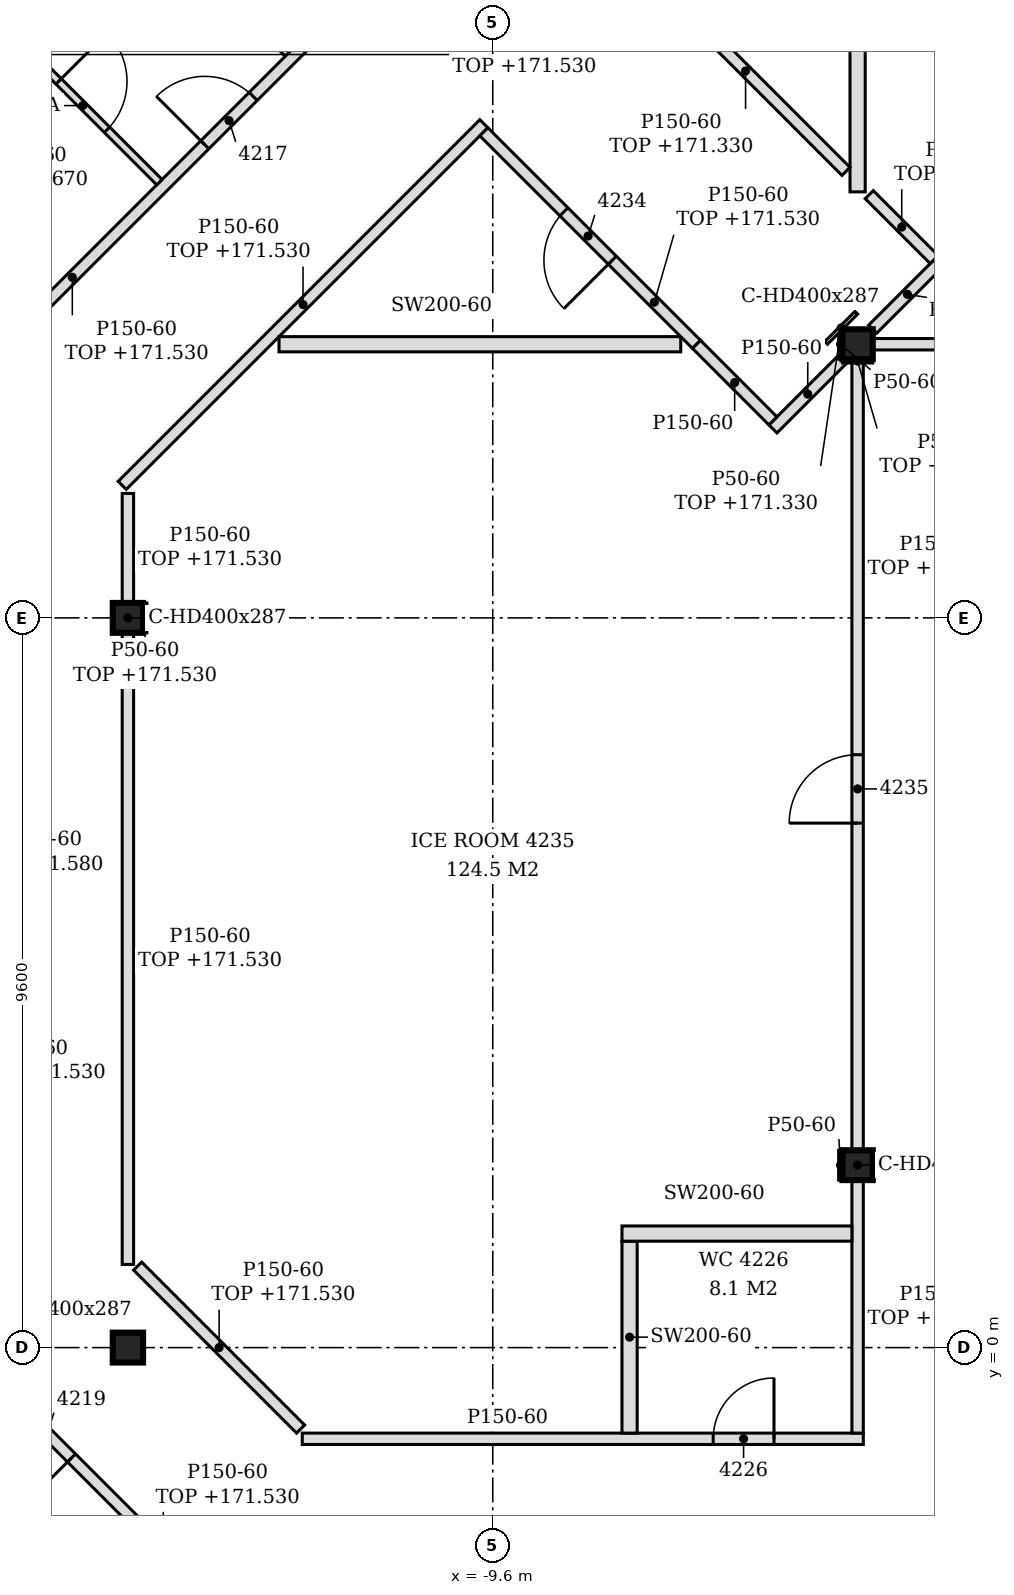
"""IFC4 building model, lengths in metres.
Left out: names, types, materials, properties, quantities, classifications, styles, units other than length and angle.
Written with IfcOpenShell. Run it as: python <this file> out.ifc"""

import sys

from ifc_helpers import new_model, si_unit, direction, frame, frame_2d, origin, origin_2d, place, context, subcontext, project, spatial, polyline, rectangle, i_section, outline, extrude, element, fill, save


model = new_model("IFC4")
c1 = context("Model", 3, precision=1e-05, world=origin(), true_north=direction((0.0, 1.0)))
c2 = subcontext(c1, "Body", "Model", "MODEL_VIEW")
j1 = project(units=[si_unit("LENGTHUNIT", "METRE"), si_unit("PLANEANGLEUNIT", "RADIAN")], contexts=[c1])
p1 = place(None, origin())
s1 = spatial("IfcSite", under=j1, at=p1, CompositionType="ELEMENT")
p2 = place(p1, origin())
s2 = spatial("IfcBuilding", under=s1, at=p2, CompositionType="ELEMENT")
p3 = place(p2, frame((0.0, 0.0, 168.6)))
s3 = spatial("IfcBuildingStorey", under=s2, at=p3, CompositionType="ELEMENT", Elevation=168.6)
for number, where, z_axis, x_axis in (
    (1, (-4.8, 2.4, -0.15), (0.0, 0.0, 1.0), (1.0, 0.0, 0.0)),
    (2, (-4.8, 13.2, -0.15), (0.0, 0.0, 1.0), (1.0, 0.0, 0.0)),
    (3, (-14.4, 0.0, -0.15), (0.0, 0.0, 1.0), (1.0, 0.0, 0.0)),
    (4, (-14.4, 9.6, -0.15), (0.0, 0.0, 1.0), (1.0, 0.0, 0.0)),
):
    element("IfcColumn", number, at=place(p3, frame(where, z_axis=z_axis, x_axis=x_axis)), inside=s3, PredefinedType="COLUMN", context=c2, shape_type="SweptSolid", body=[
        extrude(i_section(OverallWidth=0.399, OverallDepth=0.393, WebThickness=0.023, FlangeThickness=0.037, FilletRadius=0.015, at=origin_2d()), origin(), (0.0, 0.0, 1.0), 3.6),
    ])
p4 = place(p3, frame((-8.322, -8.272, 0.0), z_axis=(0.0, 0.0, 1.0), x_axis=(-0.707117118476, 0.707096443746, 0.0)))
e5 = element("IfcWall", 5, at=p4, inside=s3, PredefinedType="PARTITIONING", context=c2, shape_type="SweptSolid", body=[
    extrude(rectangle(XDim=11.809, YDim=0.15, at=frame_2d((5.904, 0.0))), origin(), (0.0, 0.0, 1.0), 2.93),
])
p5 = place(p4, frame((9.645, 0.0, 0.0)))
e6 = element("IfcOpeningElement", 6, at=p5, cuts=e5, PredefinedType="OPENING", context=c2, shape_type="SweptSolid", body=[
    extrude(rectangle(XDim=0.9, YDim=2.1, at=frame_2d((0.45, 1.05))), frame((0.0, 0.085, 0.0), z_axis=(0.0, -1.0, 0.0), x_axis=(1.0, 0.0, 0.0)), (0.0, 0.0, 1.0), 0.17),
])
p6 = place(p4, frame((5.33, 0.0, 0.0)))
e7 = element("IfcOpeningElement", 7, at=p6, cuts=e5, PredefinedType="OPENING", context=c2, shape_type="SweptSolid", body=[
    extrude(rectangle(XDim=0.9, YDim=2.1, at=frame_2d((0.45, 1.05))), frame((0.0, 0.085, 0.0), z_axis=(0.0, -1.0, 0.0), x_axis=(1.0, 0.0, 0.0)), (0.0, 0.0, 1.0), 0.17),
])
p7 = place(p4, frame((1.139, 0.0, 0.0)))
e8 = element("IfcOpeningElement", 8, at=p7, cuts=e5, PredefinedType="OPENING", context=c2, shape_type="SweptSolid", body=[
    extrude(rectangle(XDim=0.9, YDim=2.1, at=frame_2d((0.45, 1.05))), frame((0.0, 0.085, 0.0), z_axis=(0.0, -1.0, 0.0), x_axis=(1.0, 0.0, 0.0)), (0.0, 0.0, 1.0), 0.17),
])
p8 = place(p3, frame((-12.106, -1.2, 0.0), z_axis=(0.0, 0.0, 1.0), x_axis=(1.0, 0.0, 0.0)))
e9 = element("IfcWall", 9, at=p8, inside=s3, PredefinedType="PARTITIONING", context=c2, shape_type="SweptSolid", body=[
    extrude(outline(polyline([(0.0, 0.0), (7.381, 0.0), (7.381, 2.83), (7.156, 2.83), (7.154, 3.45), (0.0, 3.45), (0.0, 0.0)])), frame((0.0, 0.075, 0.0), z_axis=(0.0, -1.0, 0.0), x_axis=(1.0, 0.0, 0.0)), (0.0, 0.0, 1.0), 0.15),
])
p9 = place(p8, frame((5.406, 0.0, 0.0)))
e10 = element("IfcOpeningElement", 10, at=p9, cuts=e9, PredefinedType="OPENING", context=c2, shape_type="SweptSolid", body=[
    extrude(rectangle(XDim=0.8, YDim=2.1, at=frame_2d((0.4, 1.05))), frame((0.0, 0.085, 0.0), z_axis=(0.0, -1.0, 0.0), x_axis=(1.0, 0.0, 0.0)), (0.0, 0.0, 1.0), 0.17),
])
p10 = place(p3, frame((-12.128, -1.072, 0.0), z_axis=(0.0, 0.0, 1.0), x_axis=(-0.707106781187, 0.707106781187, 0.0)))
e11 = element("IfcWall", 11, at=p10, inside=s3, PredefinedType="PARTITIONING", context=c2, shape_type="SweptSolid", body=[
    extrude(rectangle(XDim=3.032, YDim=0.15, at=frame_2d((1.516, 0.0))), origin(), (0.0, 0.0, 1.0), 2.93),
])
p11 = place(p3, frame((-7.8, -1.125, 0.0), z_axis=(0.0, 0.0, 1.0), x_axis=(0.0, 1.0, 0.0)))
e12 = element("IfcWall", 12, at=p11, inside=s3, PredefinedType="PARTITIONING", context=c2, shape_type="SweptSolid", body=[
    extrude(outline(polyline([(0.0, 0.0), (2.525, 0.0), (2.525, 3.45), (1.225, 3.45), (1.223, 2.93), (1.025, 2.93), (1.023, 3.45), (0.0, 3.45), (0.0, 0.0)])), frame((0.0, 0.1, 0.0), z_axis=(0.0, -1.0, 0.0), x_axis=(1.0, 0.0, 0.0)), (0.0, 0.0, 1.0), 0.2),
])
p12 = place(p3, frame((-4.8, -1.125, 0.0), z_axis=(0.0, 0.0, 1.0), x_axis=(0.0, 1.0, 0.0)))
e13 = element("IfcWall", 13, at=p12, inside=s3, PredefinedType="PARTITIONING", context=c2, shape_type="SweptSolid", body=[
    extrude(rectangle(XDim=3.329, YDim=0.15, at=frame_2d((1.664, 0.0))), origin(), (0.0, 0.0, 1.0), 2.83),
])
p13 = place(p3, frame((-14.4, 1.094, 0.0), z_axis=(0.0, 0.0, 1.0), x_axis=(0.0, 1.0, 0.0)))
e14 = element("IfcWall", 14, at=p13, inside=s3, PredefinedType="PARTITIONING", context=c2, shape_type="SweptSolid", body=[
    extrude(rectangle(XDim=8.31, YDim=0.15, at=frame_2d((4.155, 0.0))), origin(), (0.0, 0.0, 1.0), 2.93),
])
p14 = place(p3, frame((-7.9, 1.5, 0.0), z_axis=(0.0, 0.0, 1.0), x_axis=(1.0, 0.0, 0.0)))
e15 = element("IfcWall", 15, at=p14, inside=s3, PredefinedType="PARTITIONING", context=c2, shape_type="SweptSolid", body=[
    extrude(outline(polyline([(0.0, 0.0), (3.025, 0.0), (3.025, 2.83), (2.95, 2.83), (2.948, 3.45), (0.0, 3.45), (0.0, 0.0)])), frame((0.0, 0.1, 0.0), z_axis=(0.0, -1.0, 0.0), x_axis=(1.0, 0.0, 0.0)), (0.0, 0.0, 1.0), 0.2),
])
p15 = place(p3, frame((-4.8, 2.596, 0.0), z_axis=(0.0, 0.0, 1.0), x_axis=(0.0, 1.0, 0.0)))
e16 = element("IfcWall", 16, at=p15, inside=s3, PredefinedType="PARTITIONING", context=c2, shape_type="SweptSolid", body=[
    extrude(rectangle(XDim=10.407, YDim=0.15, at=frame_2d((5.204, 0.0))), origin(), (0.0, 0.0, 1.0), 2.83),
])
p16 = place(p15, frame((4.303, 0.0, 0.0)))
e17 = element("IfcOpeningElement", 17, at=p16, cuts=e16, PredefinedType="OPENING", context=c2, shape_type="SweptSolid", body=[
    extrude(rectangle(XDim=0.9, YDim=2.1, at=frame_2d((0.45, 1.05))), frame((0.0, 0.085, 0.0), z_axis=(0.0, -1.0, 0.0), x_axis=(1.0, 0.0, 0.0)), (0.0, 0.0, 1.0), 0.17),
])
p17 = place(p3, frame((-14.4, 9.796, 0.0), z_axis=(0.0, 0.0, 1.0), x_axis=(0.0, 1.0, 0.0)))
e18 = element("IfcWall", 18, at=p17, inside=s3, PredefinedType="PARTITIONING", context=c2, shape_type="SweptSolid", body=[
    extrude(rectangle(XDim=1.44, YDim=0.15, at=frame_2d((0.72, 0.0))), origin(), (0.0, 0.0, 1.0), 2.93),
])
p18 = place(p3, frame((-14.475, 11.343, 0.0), z_axis=(0.0, 0.0, 1.0), x_axis=(0.707124921665, 0.707088640243, 0.0)))
e19 = element("IfcWall", 19, at=p18, inside=s3, PredefinedType="PARTITIONING", context=c2, shape_type="SweptSolid", body=[
    extrude(rectangle(XDim=6.729, YDim=0.15, at=frame_2d((3.365, 0.0))), origin(), (0.0, 0.0, 1.0), 2.93),
])
p19 = place(p3, frame((-5.914, 12.086, 0.0), z_axis=(0.0, 0.0, 1.0), x_axis=(0.707106781187, 0.707106781187, 0.0)))
e20 = element("IfcWall", 20, at=p19, inside=s3, PredefinedType="PARTITIONING", context=c2, shape_type="SweptSolid", body=[
    extrude(rectangle(XDim=1.295, YDim=0.15, at=frame_2d((0.648, 0.0))), origin(), (0.0, 0.0, 1.0), 3.45),
])
p20 = place(p3, frame((-5.914, 12.192, 0.0), z_axis=(0.0, 0.0, 1.0), x_axis=(-0.706763941595, 0.707449454633, 0.0)))
e21 = element("IfcWall", 21, at=p20, inside=s3, PredefinedType="PARTITIONING", context=c2, shape_type="SweptSolid", body=[
    extrude(rectangle(XDim=1.425, YDim=0.15, at=frame_2d((0.712, 0.0))), origin(), (0.0, 0.0, 1.0), 3.45),
])
p21 = place(p3, frame((-16.875, 12.337, 0.0), z_axis=(0.0, 0.0, 1.0), x_axis=(0.707106781187, 0.707106781187, 0.0)))
e22 = element("IfcWall", 22, at=p21, inside=s3, PredefinedType="PARTITIONING", context=c2, shape_type="SweptSolid", body=[
    extrude(rectangle(XDim=9.148, YDim=0.15, at=frame_2d((4.574, 0.0))), origin(), (0.0, 0.0, 1.0), 2.93),
])
p22 = place(p21, frame((7.426, 0.0, 0.0)))
e23 = element("IfcOpeningElement", 23, at=p22, cuts=e22, PredefinedType="OPENING", context=c2, shape_type="SweptSolid", body=[
    extrude(rectangle(XDim=0.9, YDim=2.1, at=frame_2d((0.45, 1.05))), frame((0.0, 0.085, 0.0), z_axis=(0.0, -1.0, 0.0), x_axis=(1.0, 0.0, 0.0)), (0.0, 0.0, 1.0), 0.17),
])
p23 = place(p21, frame((4.932, 0.0, 0.0)))
e24 = element("IfcOpeningElement", 24, at=p23, cuts=e22, PredefinedType="OPENING", context=c2, shape_type="SweptSolid", body=[
    extrude(rectangle(XDim=0.9, YDim=2.1, at=frame_2d((0.45, 1.05))), frame((0.0, 0.085, 0.0), z_axis=(0.0, -1.0, 0.0), x_axis=(1.0, 0.0, 0.0)), (0.0, 0.0, 1.0), 0.17),
])
p24 = place(p3, frame((-12.412, 13.2, 0.0), z_axis=(0.0, 0.0, 1.0), x_axis=(1.0, 0.0, 0.0)))
e25 = element("IfcWall", 25, at=p24, inside=s3, PredefinedType="PARTITIONING", context=c2, shape_type="SweptSolid", body=[
    extrude(rectangle(XDim=5.285, YDim=0.2, at=frame_2d((2.643, 0.0))), origin(), (0.0, 0.0, 1.0), 3.45),
])
p25 = place(p3, frame((-6.921, 13.2, 0.0), z_axis=(0.0, 0.0, 1.0), x_axis=(-0.707230271715, 0.706983269088, 0.0)))
e26 = element("IfcWall", 26, at=p25, inside=s3, PredefinedType="PARTITIONING", context=c2, shape_type="SweptSolid", body=[
    extrude(rectangle(XDim=3.954, YDim=0.15, at=frame_2d((1.977, 0.0))), origin(), (0.0, 0.0, 1.0), 2.93),
])
p26 = place(p25, frame((1.564, 0.0, 0.0)))
e27 = element("IfcOpeningElement", 27, at=p26, cuts=e26, PredefinedType="OPENING", context=c2, shape_type="SweptSolid", body=[
    extrude(rectangle(XDim=0.9, YDim=2.1, at=frame_2d((0.45, 1.05))), frame((0.0, 0.085, 0.0), z_axis=(0.0, -1.0, 0.0), x_axis=(1.0, 0.0, 0.0)), (0.0, 0.0, 1.0), 0.17),
])
p27 = place(p3, frame((-4.601, 13.2, 0.0), z_axis=(0.0, 0.0, 1.0), x_axis=(1.0, 0.0, 0.0)))
e28 = element("IfcWall", 28, at=p27, inside=s3, PredefinedType="PARTITIONING", context=c2, shape_type="SweptSolid", body=[
    extrude(rectangle(XDim=9.476, YDim=0.15, at=frame_2d((4.738, 0.0))), origin(), (0.0, 0.0, 1.0), 2.83),
])
p28 = place(p27, frame((4.151, 0.0, 0.0)))
e29 = element("IfcOpeningElement", 29, at=p28, cuts=e28, PredefinedType="OPENING", context=c2, shape_type="SweptSolid", body=[
    extrude(rectangle(XDim=0.9, YDim=2.1, at=frame_2d((0.45, 1.05))), frame((0.0, 0.085, 0.0), z_axis=(0.0, -1.0, 0.0), x_axis=(1.0, 0.0, 0.0)), (0.0, 0.0, 1.0), 0.17),
])
p29 = place(p3, frame((-4.602, 13.398, 0.0), z_axis=(0.0, 0.0, 1.0), x_axis=(0.707106781187, 0.707106781187, 0.0)))
e30 = element("IfcWall", 30, at=p29, inside=s3, PredefinedType="PARTITIONING", context=c2, shape_type="SweptSolid", body=[
    extrude(rectangle(XDim=1.296, YDim=0.15, at=frame_2d((0.648, 0.0))), origin(), (0.0, 0.0, 1.0), 3.45),
])
p30 = place(p3, frame((-3.792, 14.314, 0.0), z_axis=(0.0, 0.0, 1.0), x_axis=(-0.707409718716, 0.706803713817, 0.0)))
e31 = element("IfcWall", 31, at=p30, inside=s3, PredefinedType="PARTITIONING", context=c2, shape_type="SweptSolid", body=[
    extrude(rectangle(XDim=1.208, YDim=0.15, at=frame_2d((0.604, 0.0))), origin(), (0.0, 0.0, 1.0), 2.73),
])
p31 = place(p3, frame((-4.8, 15.205, 0.0), z_axis=(0.0, 0.0, 1.0), x_axis=(0.0, 1.0, 0.0)))
e32 = element("IfcWall", 32, at=p31, inside=s3, PredefinedType="PARTITIONING", context=c2, shape_type="SweptSolid", body=[
    extrude(rectangle(XDim=5.607, YDim=0.2, at=frame_2d((2.804, 0.0))), origin(), (0.0, 0.0, 1.0), 2.73),
])
p32 = place(p3, frame((-13.986, 15.332, 0.0), z_axis=(0.0, 0.0, 1.0), x_axis=(-0.707106781187, 0.707106781187, 0.0)))
e33 = element("IfcWall", 33, at=p32, inside=s3, PredefinedType="PARTITIONING", context=c2, shape_type="SweptSolid", body=[
    extrude(rectangle(XDim=2.874, YDim=0.1, at=frame_2d((1.437, 0.0))), origin(), (0.0, 0.0, 1.0), 2.93),
])
p33 = place(p32, frame((0.975, 0.0, 0.0)))
e34 = element("IfcOpeningElement", 34, at=p33, cuts=e33, PredefinedType="OPENING", context=c2, shape_type="SweptSolid", body=[
    extrude(rectangle(XDim=0.9, YDim=2.1, at=frame_2d((0.45, 1.05))), frame((0.0, 0.06, 0.0), z_axis=(0.0, -1.0, 0.0), x_axis=(1.0, 0.0, 0.0)), (0.0, 0.0, 1.0), 0.12),
])
p34 = place(p3, frame((-4.953, 15.474, 0.0), z_axis=(0.0, 0.0, 1.0), x_axis=(-0.707008778354, 0.707204770438, 0.0)))
e35 = element("IfcWall", 35, at=p34, inside=s3, PredefinedType="PARTITIONING", context=c2, shape_type="SweptSolid", body=[
    extrude(rectangle(XDim=3.737, YDim=0.15, at=frame_2d((1.869, 0.0))), origin(), (0.0, 0.0, 1.0), 2.73),
])
p35 = place(p3, frame((-12.259, 17.059, 0.0), z_axis=(0.0, 0.0, 1.0), x_axis=(-0.707106781187, 0.707106781187, 0.0)))
e36 = element("IfcWall", 36, at=p35, inside=s3, PredefinedType="PARTITIONING", context=c2, shape_type="SweptSolid", body=[
    extrude(rectangle(XDim=2.748, YDim=0.2, at=frame_2d((1.374, 0.0))), origin(), (0.0, 0.0, 1.0), 2.93),
])
p36 = place(p3, frame((-5.024, 2.204, 0.0), z_axis=(0.0, 0.0, 1.0), x_axis=(0.0, 1.0, 0.0)))
e37 = element("IfcWall", 37, at=p36, inside=s3, PredefinedType="PARTITIONING", context=c2, shape_type="SweptSolid", body=[
    extrude(rectangle(XDim=0.393, YDim=0.05, at=frame_2d((0.196, 0.0))), origin(), (0.0, 0.0, 1.0), 3.45),
])
p37 = place(p3, frame((-5.024, 13.003, 0.0), z_axis=(0.0, 0.0, 1.0), x_axis=(0.0, 1.0, 0.0)))
e38 = element("IfcWall", 38, at=p37, inside=s3, PredefinedType="PARTITIONING", context=c2, shape_type="SweptSolid", body=[
    extrude(rectangle(XDim=0.393, YDim=0.05, at=frame_2d((0.197, 0.0))), origin(), (0.0, 0.0, 1.0), 3.45),
])
p38 = place(p3, frame((-14.176, 9.404, 0.0), z_axis=(0.0, 0.0, 1.0), x_axis=(0.0, 1.0, 0.0)))
e39 = element("IfcWall", 39, at=p38, inside=s3, PredefinedType="PARTITIONING", context=c2, shape_type="SweptSolid", body=[
    extrude(rectangle(XDim=0.393, YDim=0.05, at=frame_2d((0.196, 0.0))), origin(), (0.0, 0.0, 1.0), 2.93),
])
p39 = place(p3, frame((-5.214, 13.218, 0.0), z_axis=(0.0, 0.0, 1.0), x_axis=(0.707106781187, 0.707106781187, 0.0)))
e40 = element("IfcWall", 40, at=p39, inside=s3, PredefinedType="PARTITIONING", context=c2, shape_type="SweptSolid", body=[
    extrude(rectangle(XDim=0.56, YDim=0.05, at=frame_2d((0.28, 0.0))), origin(), (0.0, 0.0, 1.0), 2.73),
])
p40 = place(p3, frame((-5.0, 12.979, 0.0), z_axis=(0.0, 0.0, 1.0), x_axis=(1.0, 0.0, 0.0)))
e41 = element("IfcWall", 41, at=p40, inside=s3, PredefinedType="PARTITIONING", context=c2, shape_type="SweptSolid", body=[
    extrude(rectangle(XDim=0.399, YDim=0.05, at=frame_2d((0.199, 0.0))), origin(), (0.0, 0.0, 1.0), 2.83),
])
p41 = place(p23, origin())
e42 = element("IfcDoor", 42, at=p41, inside=s3, OperationType="SINGLE_SWING_LEFT", PredefinedType="DOOR", context=c2, shape_type="SweptSolid", body=[
    extrude(rectangle(XDim=0.9, YDim=2.1, at=frame_2d((0.45, 1.05))), frame((0.0, 0.025, 0.0), z_axis=(0.0, -1.0, 0.0), x_axis=(1.0, 0.0, 0.0)), (0.0, 0.0, 1.0), 0.05),
])
fill(e24, e42)
p42 = place(p33, frame((0.9, 0.0, 0.0), z_axis=(0.0, 0.0, 1.0), x_axis=(-1.0, 0.0, 0.0)))
e43 = element("IfcDoor", 43, at=p42, inside=s3, OperationType="SINGLE_SWING_LEFT", PredefinedType="DOOR", context=c2, shape_type="SweptSolid", body=[
    extrude(rectangle(XDim=0.9, YDim=2.1, at=frame_2d((0.45, 1.05))), frame((0.0, 0.025, 0.0), z_axis=(0.0, -1.0, 0.0), x_axis=(1.0, 0.0, 0.0)), (0.0, 0.0, 1.0), 0.05),
])
fill(e34, e43)
p43 = place(p5, origin())
e44 = element("IfcDoor", 44, at=p43, inside=s3, OperationType="SINGLE_SWING_LEFT", PredefinedType="DOOR", context=c2, shape_type="SweptSolid", body=[
    extrude(rectangle(XDim=0.9, YDim=2.1, at=frame_2d((0.45, 1.05))), frame((0.0, 0.025, 0.0), z_axis=(0.0, -1.0, 0.0), x_axis=(1.0, 0.0, 0.0)), (0.0, 0.0, 1.0), 0.05),
])
fill(e6, e44)
p44 = place(p9, origin())
e45 = element("IfcDoor", 45, at=p44, inside=s3, OperationType="SINGLE_SWING_RIGHT", PredefinedType="DOOR", context=c2, shape_type="SweptSolid", body=[
    extrude(rectangle(XDim=0.8, YDim=2.1, at=frame_2d((0.4, 1.05))), frame((0.0, 0.025, 0.0), z_axis=(0.0, -1.0, 0.0), x_axis=(1.0, 0.0, 0.0)), (0.0, 0.0, 1.0), 0.05),
])
fill(e10, e45)
p45 = place(p26, origin())
e46 = element("IfcDoor", 46, at=p45, inside=s3, OperationType="SINGLE_SWING_LEFT", PredefinedType="DOOR", context=c2, shape_type="SweptSolid", body=[
    extrude(rectangle(XDim=0.9, YDim=2.1, at=frame_2d((0.45, 1.05))), frame((0.0, 0.025, 0.0), z_axis=(0.0, -1.0, 0.0), x_axis=(1.0, 0.0, 0.0)), (0.0, 0.0, 1.0), 0.05),
])
fill(e27, e46)
p46 = place(p16, origin())
e47 = element("IfcDoor", 47, at=p46, inside=s3, OperationType="SINGLE_SWING_LEFT", PredefinedType="DOOR", context=c2, shape_type="SweptSolid", body=[
    extrude(rectangle(XDim=0.9, YDim=2.1, at=frame_2d((0.45, 1.05))), frame((0.0, 0.025, 0.0), z_axis=(0.0, -1.0, 0.0), x_axis=(1.0, 0.0, 0.0)), (0.0, 0.0, 1.0), 0.05),
])
fill(e17, e47)
save(model, sys.argv[1])
